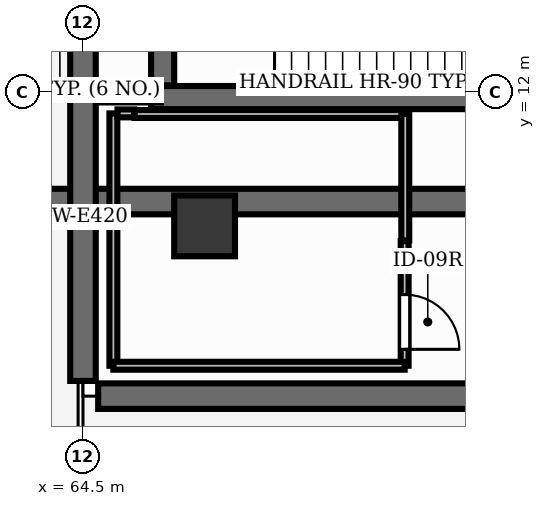
"""IFC4 building model, lengths in metres.
Left out: names, types, materials, properties, quantities, classifications, styles, units other than length and angle.
Written with IfcOpenShell. Run it as: python <this file> out.ifc"""

import sys

from ifc_helpers import new_model, si_unit, direction, frame, frame_2d, origin, origin_2d, place, context, subcontext, project, spatial, rectangle, extrude, element, fill, save


model = new_model("IFC4")
c1 = context("Model", 3, precision=1e-05, world=origin(), true_north=direction((0.0, 1.0)))
c2 = subcontext(c1, "Body", "Model", "MODEL_VIEW")
j1 = project(units=[si_unit("LENGTHUNIT", "METRE"), si_unit("PLANEANGLEUNIT", "RADIAN")], contexts=[c1])
p1 = place(None, origin())
s1 = spatial("IfcSite", under=j1, at=p1, CompositionType="ELEMENT")
p2 = place(p1, origin())
s2 = spatial("IfcBuilding", under=s1, at=p2, CompositionType="ELEMENT")
p3 = place(p2, origin())
s3 = spatial("IfcBuildingStorey", under=s2, at=p3, CompositionType="ELEMENT", Elevation=0.0)
p4 = place(p3, frame((54.35, 10.2, 0.0), z_axis=(0.0, 0.0, 1.0), x_axis=(1.0, 0.0, 0.0)))
e1 = element("IfcWall", 1, at=p4, inside=s3, PredefinedType="SHEAR", context=c2, shape_type="SweptSolid", body=[
    extrude(rectangle(XDim=10.07, YDim=0.42, at=frame_2d((5.035, 0.0))), origin(), (0.0, 0.0, 1.0), 3.8),
])
p5 = place(p3, frame((64.5, 10.2, 0.0), z_axis=(0.0, 0.0, 1.0), x_axis=(1.0, 0.0, 0.0)))
e2 = element("IfcWall", 2, at=p5, inside=s3, PredefinedType="SHEAR", context=c2, shape_type="SweptSolid", body=[
    extrude(rectangle(XDim=27.4, YDim=0.42, at=frame_2d((13.7, 0.0))), origin(), (0.0, 0.0, 1.0), 3.8),
])
p6 = place(p3, frame((66.5, 9.8, 0.0), z_axis=(0.0, 0.0, 1.0), x_axis=(1.0, 0.0, 0.0)))
e3 = element("IfcColumn", 3, at=p6, inside=s3, PredefinedType="COLUMN", context=c2, shape_type="SweptSolid", body=[
    extrude(rectangle(XDim=1.0, YDim=1.0, at=origin_2d()), origin(), (0.0, 0.0, 1.0), 5.1),
])
p7 = place(p3, frame((64.5, 7.25, 0.0), z_axis=(0.0, 0.0, 1.0), x_axis=(0.0, 1.0, 0.0)))
e4 = element("IfcWall", 4, at=p7, inside=s3, PredefinedType="SHEAR", context=c2, shape_type="SweptSolid", body=[
    extrude(rectangle(XDim=39.5, YDim=0.42, at=frame_2d((19.75, 0.0))), origin(), (0.0, 0.0, 1.0), 5.1),
])
p8 = place(p7, frame((9.2, 0.0, 0.9)))
e5 = element("IfcOpeningElement", 5, at=p8, cuts=e4, PredefinedType="OPENING", context=c2, shape_type="SweptSolid", body=[
    extrude(rectangle(XDim=1.2, YDim=2.7, at=frame_2d((0.6, 1.35))), frame((0.0, 0.225, 0.0), z_axis=(0.0, -1.0, 0.0), x_axis=(1.0, 0.0, 0.0)), (0.0, 0.0, 1.0), 0.45),
])
p9 = place(p7, frame((12.6, 0.0, 0.9)))
e6 = element("IfcOpeningElement", 6, at=p9, cuts=e4, PredefinedType="OPENING", context=c2, shape_type="SweptSolid", body=[
    extrude(rectangle(XDim=1.2, YDim=2.7, at=frame_2d((0.6, 1.35))), frame((0.0, 0.225, 0.0), z_axis=(0.0, -1.0, 0.0), x_axis=(1.0, 0.0, 0.0)), (0.0, 0.0, 1.0), 0.45),
])
p10 = place(p7, frame((24.8, 0.0, 0.9)))
e7 = element("IfcOpeningElement", 7, at=p10, cuts=e4, PredefinedType="OPENING", context=c2, shape_type="SweptSolid", body=[
    extrude(rectangle(XDim=1.2, YDim=2.7, at=frame_2d((0.6, 1.35))), frame((0.0, 0.225, 0.0), z_axis=(0.0, -1.0, 0.0), x_axis=(1.0, 0.0, 0.0)), (0.0, 0.0, 1.0), 0.45),
])
p11 = place(p7, frame((36.2, 0.0, 0.9)))
e8 = element("IfcOpeningElement", 8, at=p11, cuts=e4, PredefinedType="OPENING", context=c2, shape_type="SweptSolid", body=[
    extrude(rectangle(XDim=1.2, YDim=2.7, at=frame_2d((0.6, 1.35))), frame((0.0, 0.225, 0.0), z_axis=(0.0, -1.0, 0.0), x_axis=(1.0, 0.0, 0.0)), (0.0, 0.0, 1.0), 0.45),
])
p12 = place(p7, frame((15.4, 0.0, 0.0)))
e9 = element("IfcOpeningElement", 9, at=p12, cuts=e4, PredefinedType="OPENING", context=c2, shape_type="SweptSolid", body=[
    extrude(rectangle(XDim=2.4, YDim=2.7, at=frame_2d((1.2, 1.35))), frame((0.0, 0.225, 0.0), z_axis=(0.0, -1.0, 0.0), x_axis=(1.0, 0.0, 0.0)), (0.0, 0.0, 1.0), 0.45),
])
p13 = place(p7, frame((21.6, 0.0, 0.0)))
e10 = element("IfcOpeningElement", 10, at=p13, cuts=e4, PredefinedType="OPENING", context=c2, shape_type="SweptSolid", body=[
    extrude(rectangle(XDim=2.4, YDim=2.7, at=frame_2d((1.2, 1.35))), frame((0.0, 0.225, 0.0), z_axis=(0.0, -1.0, 0.0), x_axis=(1.0, 0.0, 0.0)), (0.0, 0.0, 1.0), 0.45),
])
p14 = place(p7, frame((5.6, 0.0, 0.0)))
e11 = element("IfcOpeningElement", 11, at=p14, cuts=e4, PredefinedType="OPENING", context=c2, shape_type="SweptSolid", body=[
    extrude(rectangle(XDim=2.0, YDim=2.3, at=frame_2d((1.0, 1.15))), frame((0.0, 0.225, 0.0), z_axis=(0.0, -1.0, 0.0), x_axis=(1.0, 0.0, 0.0)), (0.0, 0.0, 1.0), 0.45),
])
p15 = place(p7, frame((31.9, 0.0, 0.0)))
e12 = element("IfcOpeningElement", 12, at=p15, cuts=e4, PredefinedType="OPENING", context=c2, shape_type="SweptSolid", body=[
    extrude(rectangle(XDim=2.0, YDim=2.3, at=frame_2d((1.0, 1.15))), frame((0.0, 0.225, 0.0), z_axis=(0.0, -1.0, 0.0), x_axis=(1.0, 0.0, 0.0)), (0.0, 0.0, 1.0), 0.45),
])
p16 = place(p3, frame((94.25, 7.0, 0.0), z_axis=(0.0, 0.0, 1.0), x_axis=(-1.0, 0.0, 0.0)))
e13 = element("IfcWall", 13, at=p16, inside=s3, PredefinedType="SHEAR", context=c2, shape_type="SweptSolid", body=[
    extrude(rectangle(XDim=29.5, YDim=0.42, at=frame_2d((14.75, 0.0))), origin(), (0.0, 0.0, 1.0), 5.1),
])
p17 = place(p3, frame((65.62, 11.91, 0.0), z_axis=(0.0, 0.0, 1.0), x_axis=(1.0, 0.0, 0.0)))
e14 = element("IfcWall", 14, at=p17, inside=s3, PredefinedType="SHEAR", context=c2, shape_type="SweptSolid", body=[
    extrude(rectangle(XDim=8.61, YDim=0.38, at=frame_2d((4.305, 0.0))), origin(), (0.0, 0.0, 1.0), 5.1),
])
p18 = place(p3, frame((65.81, 12.11, 0.0), z_axis=(0.0, 0.0, 1.0), x_axis=(0.0, 1.0, 0.0)))
e15 = element("IfcWall", 15, at=p18, inside=s3, PredefinedType="SHEAR", context=c2, shape_type="SweptSolid", body=[
    extrude(rectangle(XDim=3.48, YDim=0.38, at=frame_2d((1.74, 0.0))), origin(), (0.0, 0.0, 1.0), 5.1),
])
p19 = place(p18, frame((1.2, 0.0, 0.0)))
e16 = element("IfcOpeningElement", 16, at=p19, cuts=e15, PredefinedType="OPENING", context=c2, shape_type="SweptSolid", body=[
    extrude(rectangle(XDim=1.05, YDim=2.15, at=frame_2d((0.525, 1.075))), frame((0.0, 0.205, 0.0), z_axis=(0.0, -1.0, 0.0), x_axis=(1.0, 0.0, 0.0)), (0.0, 0.0, 1.0), 0.41),
])
p20 = place(p3, frame((64.75, 11.91, 0.0), z_axis=(0.0, 0.0, 1.0), x_axis=(1.0, 0.0, 0.0)))
e17 = element("IfcWall", 17, at=p20, inside=s3, PredefinedType="PARTITIONING", context=c2, shape_type="SweptSolid", body=[
    extrude(rectangle(XDim=1.03, YDim=0.16, at=frame_2d((0.515, 0.0))), origin(), (0.0, 0.0, 1.0), 4.11),
])
p21 = place(p3, frame((69.79, 9.55, 0.0), z_axis=(0.0, 0.0, 1.0), x_axis=(0.0, -1.0, 0.0)))
e18 = element("IfcWall", 18, at=p21, inside=s3, PredefinedType="PARTITIONING", context=c2, shape_type="SweptSolid", body=[
    extrude(rectangle(XDim=2.05, YDim=0.13, at=frame_2d((1.025, 0.0))), origin(), (0.0, 0.0, 1.0), 4.11),
])
p22 = place(p21, frame((0.88, 0.0, 0.0)))
e19 = element("IfcOpeningElement", 19, at=p22, cuts=e18, PredefinedType="OPENING", context=c2, shape_type="SweptSolid", body=[
    extrude(rectangle(XDim=0.9, YDim=2.15, at=frame_2d((0.45, 1.075))), frame((0.0, 0.08, 0.0), z_axis=(0.0, -1.0, 0.0), x_axis=(1.0, 0.0, 0.0)), (0.0, 0.0, 1.0), 0.16),
])
p23 = place(p3, frame((65.0, 7.5, 0.0), z_axis=(0.0, 0.0, 1.0), x_axis=(0.0, 1.0, 0.0)))
e20 = element("IfcWall", 20, at=p23, inside=s3, PredefinedType="PARTITIONING", context=c2, shape_type="SweptSolid", body=[
    extrude(rectangle(XDim=4.15, YDim=0.13, at=frame_2d((2.075, 0.0))), origin(), (0.0, 0.0, 1.0), 4.11),
])
p24 = place(p3, frame((65.068, 11.65, 0.0), z_axis=(0.0, 0.0, 1.0), x_axis=(1.0, 0.0, 0.0)))
e21 = element("IfcWall", 21, at=p24, inside=s3, PredefinedType="PARTITIONING", context=c2, shape_type="SweptSolid", body=[
    extrude(rectangle(XDim=0.272, YDim=0.13, at=frame_2d((0.136, 0.0))), origin(), (0.0, 0.0, 1.0), 4.11),
])
p25 = place(p3, frame((65.35, 11.64, 0.0), z_axis=(0.0, 0.0, 1.0), x_axis=(1.0, 0.0, 0.0)))
e22 = element("IfcWall", 22, at=p25, inside=s3, PredefinedType="PARTITIONING", context=c2, shape_type="SweptSolid", body=[
    extrude(rectangle(XDim=4.45, YDim=0.13, at=frame_2d((2.225, 0.0))), origin(), (0.0, 0.0, 1.0), 4.11),
])
p26 = place(p3, frame((69.8, 11.64, 0.0), z_axis=(0.0, 0.0, 1.0), x_axis=(0.0, -1.0, 0.0)))
e23 = element("IfcWall", 23, at=p26, inside=s3, PredefinedType="PARTITIONING", context=c2, shape_type="SweptSolid", body=[
    extrude(rectangle(XDim=2.08, YDim=0.13, at=frame_2d((1.04, 0.0))), origin(), (0.0, 0.0, 1.0), 4.11),
])
p27 = place(p3, frame((69.79, 7.5, 0.0), z_axis=(0.0, 0.0, 1.0), x_axis=(-1.0, 0.0, 0.0)))
e24 = element("IfcWall", 24, at=p27, inside=s3, PredefinedType="PARTITIONING", context=c2, shape_type="SweptSolid", body=[
    extrude(rectangle(XDim=4.79, YDim=0.13, at=frame_2d((2.395, 0.0))), origin(), (0.0, 0.0, 1.0), 4.11),
])
p28 = place(p22, origin())
e25 = element("IfcDoor", 25, at=p28, inside=s3, OperationType="SINGLE_SWING_RIGHT", PredefinedType="DOOR", context=c2, shape_type="SweptSolid", body=[
    extrude(rectangle(XDim=0.9, YDim=2.15, at=frame_2d((0.45, 1.075))), frame((0.0, 0.025, 0.0), z_axis=(0.0, -1.0, 0.0), x_axis=(1.0, 0.0, 0.0)), (0.0, 0.0, 1.0), 0.05),
])
fill(e19, e25)
save(model, sys.argv[1])
